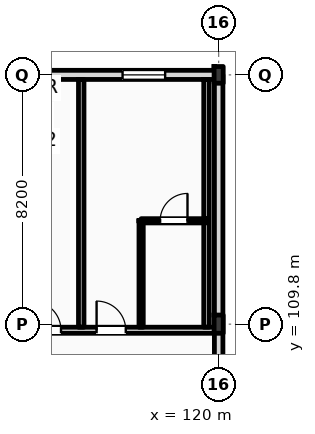
"""IFC4 building model, lengths in metres.
Left out: names, types, materials, properties, quantities, classifications, styles, units other than length and angle.
Written with IfcOpenShell. Run it as: python <this file> out.ifc"""

import sys

from ifc_helpers import new_model, si_unit, direction, frame, frame_2d, origin, origin_2d, place, context, subcontext, project, spatial, rectangle, i_section, extrude, element, fill, save


model = new_model("IFC4")
c1 = context("Model", 3, precision=1e-05, world=origin(), true_north=direction((0.0, 1.0)))
c2 = subcontext(c1, "Body", "Model", "MODEL_VIEW")
j1 = project(units=[si_unit("LENGTHUNIT", "METRE"), si_unit("PLANEANGLEUNIT", "RADIAN")], contexts=[c1])
p1 = place(None, origin())
s1 = spatial("IfcSite", under=j1, at=p1, CompositionType="ELEMENT")
p2 = place(p1, origin())
s2 = spatial("IfcBuilding", under=s1, at=p2, CompositionType="ELEMENT")
p3 = place(p2, frame((0.0, 0.0, 20.4)))
s3 = spatial("IfcBuildingStorey", under=s2, at=p3, CompositionType="ELEMENT", Elevation=20.4)
p4 = place(p3, frame((120.0, 109.8, 0.0), z_axis=(0.0, 0.0, 1.0), x_axis=(1.0, 0.0, 0.0)))
e1 = element("IfcColumn", 1, at=p4, inside=s3, PredefinedType="COLUMN", context=c2, shape_type="SweptSolid", body=[
    extrude(i_section(OverallWidth=0.3, OverallDepth=0.6, WebThickness=0.015, FlangeThickness=0.03, FilletRadius=0.027, at=origin_2d()), origin(), (0.0, 0.0, 1.0), 4.2),
])
p5 = place(p3, frame((120.0, 118.0, 0.0), z_axis=(0.0, 0.0, 1.0), x_axis=(1.0, 0.0, 0.0)))
e2 = element("IfcColumn", 2, at=p5, inside=s3, PredefinedType="COLUMN", context=c2, shape_type="SweptSolid", body=[
    extrude(i_section(OverallWidth=0.3, OverallDepth=0.55, WebThickness=0.015, FlangeThickness=0.029, FilletRadius=0.027, at=origin_2d()), origin(), (0.0, 0.0, 1.0), 4.2),
])
p6 = place(p3, frame((22.5, 118.0, 0.0), z_axis=(0.0, 0.0, 1.0), x_axis=(1.0, 0.0, 0.0)))
e3 = element("IfcWall", 3, at=p6, inside=s3, PredefinedType="STANDARD", context=c2, shape_type="SweptSolid", body=[
    extrude(rectangle(XDim=97.5, YDim=0.3, at=frame_2d((48.75, 0.0))), origin(), (0.0, 0.0, 1.0), 3.38),
])
p7 = place(p6, frame((0.91, 0.0, 0.9)))
e4 = element("IfcOpeningElement", 4, at=p7, cuts=e3, PredefinedType="OPENING", context=c2, shape_type="SweptSolid", body=[
    extrude(rectangle(XDim=0.9, YDim=1.8, at=frame_2d((0.45, 0.9))), frame((0.0, 0.16, 0.0), z_axis=(0.0, -1.0, 0.0), x_axis=(1.0, 0.0, 0.0)), (0.0, 0.0, 1.0), 0.32),
])
p8 = place(p6, frame((6.36, 0.0, 0.0)))
e5 = element("IfcOpeningElement", 5, at=p8, cuts=e3, PredefinedType="OPENING", context=c2, shape_type="SweptSolid", body=[
    extrude(rectangle(XDim=1.2, YDim=2.25, at=frame_2d((0.6, 1.125))), frame((0.0, 0.16, 0.0), z_axis=(0.0, -1.0, 0.0), x_axis=(1.0, 0.0, 0.0)), (0.0, 0.0, 1.0), 0.32),
])
p9 = place(p6, frame((11.41, 0.0, 0.9)))
e6 = element("IfcOpeningElement", 6, at=p9, cuts=e3, PredefinedType="OPENING", context=c2, shape_type="SweptSolid", body=[
    extrude(rectangle(XDim=1.1, YDim=1.9, at=frame_2d((0.55, 0.95))), frame((0.0, 0.16, 0.0), z_axis=(0.0, -1.0, 0.0), x_axis=(1.0, 0.0, 0.0)), (0.0, 0.0, 1.0), 0.32),
])
p10 = place(p6, frame((14.335, 0.0, 0.9)))
e7 = element("IfcOpeningElement", 7, at=p10, cuts=e3, PredefinedType="OPENING", context=c2, shape_type="SweptSolid", body=[
    extrude(rectangle(XDim=1.65, YDim=1.95, at=frame_2d((0.825, 0.975))), frame((0.0, 0.16, 0.0), z_axis=(0.0, -1.0, 0.0), x_axis=(1.0, 0.0, 0.0)), (0.0, 0.0, 1.0), 0.32),
])
p11 = place(p6, frame((19.26, 0.0, 0.9)))
e8 = element("IfcOpeningElement", 8, at=p11, cuts=e3, PredefinedType="OPENING", context=c2, shape_type="SweptSolid", body=[
    extrude(rectangle(XDim=1.35, YDim=2.0, at=frame_2d((0.675, 1.0))), frame((0.0, 0.16, 0.0), z_axis=(0.0, -1.0, 0.0), x_axis=(1.0, 0.0, 0.0)), (0.0, 0.0, 1.0), 0.32),
])
p12 = place(p6, frame((22.8, 0.0, 0.0)))
e9 = element("IfcOpeningElement", 9, at=p12, cuts=e3, PredefinedType="OPENING", context=c2, shape_type="SweptSolid", body=[
    extrude(rectangle(XDim=1.2, YDim=2.25, at=frame_2d((0.6, 1.125))), frame((0.0, 0.16, 0.0), z_axis=(0.0, -1.0, 0.0), x_axis=(1.0, 0.0, 0.0)), (0.0, 0.0, 1.0), 0.32),
])
p13 = place(p6, frame((26.91, 0.0, 0.9)))
e10 = element("IfcOpeningElement", 10, at=p13, cuts=e3, PredefinedType="OPENING", context=c2, shape_type="SweptSolid", body=[
    extrude(rectangle(XDim=2.1, YDim=2.1, at=frame_2d((1.05, 1.05))), frame((0.0, 0.16, 0.0), z_axis=(0.0, -1.0, 0.0), x_axis=(1.0, 0.0, 0.0)), (0.0, 0.0, 1.0), 0.32),
])
p14 = place(p6, frame((30.835, 0.0, 0.9)))
e11 = element("IfcOpeningElement", 11, at=p14, cuts=e3, PredefinedType="OPENING", context=c2, shape_type="SweptSolid", body=[
    extrude(rectangle(XDim=2.25, YDim=2.15, at=frame_2d((1.125, 1.075))), frame((0.0, 0.16, 0.0), z_axis=(0.0, -1.0, 0.0), x_axis=(1.0, 0.0, 0.0)), (0.0, 0.0, 1.0), 0.32),
])
p15 = place(p6, frame((34.96, 0.0, 0.9)))
e12 = element("IfcOpeningElement", 12, at=p15, cuts=e3, PredefinedType="OPENING", context=c2, shape_type="SweptSolid", body=[
    extrude(rectangle(XDim=2.4, YDim=2.2, at=frame_2d((1.2, 1.1))), frame((0.0, 0.16, 0.0), z_axis=(0.0, -1.0, 0.0), x_axis=(1.0, 0.0, 0.0)), (0.0, 0.0, 1.0), 0.32),
])
p16 = place(p6, frame((39.0, 0.0, 0.0)))
e13 = element("IfcOpeningElement", 13, at=p16, cuts=e3, PredefinedType="OPENING", context=c2, shape_type="SweptSolid", body=[
    extrude(rectangle(XDim=1.2, YDim=2.25, at=frame_2d((0.6, 1.125))), frame((0.0, 0.16, 0.0), z_axis=(0.0, -1.0, 0.0), x_axis=(1.0, 0.0, 0.0)), (0.0, 0.0, 1.0), 0.32),
])
p17 = place(p6, frame((43.21, 0.0, 0.9)))
e14 = element("IfcOpeningElement", 14, at=p17, cuts=e3, PredefinedType="OPENING", context=c2, shape_type="SweptSolid", body=[
    extrude(rectangle(XDim=2.7, YDim=2.3, at=frame_2d((1.35, 1.15))), frame((0.0, 0.16, 0.0), z_axis=(0.0, -1.0, 0.0), x_axis=(1.0, 0.0, 0.0)), (0.0, 0.0, 1.0), 0.32),
])
p18 = place(p6, frame((47.335, 0.0, 0.9)))
e15 = element("IfcOpeningElement", 15, at=p18, cuts=e3, PredefinedType="OPENING", context=c2, shape_type="SweptSolid", body=[
    extrude(rectangle(XDim=1.35, YDim=2.3, at=frame_2d((0.675, 1.15))), frame((0.0, 0.16, 0.0), z_axis=(0.0, -1.0, 0.0), x_axis=(1.0, 0.0, 0.0)), (0.0, 0.0, 1.0), 0.32),
])
p19 = place(p6, frame((52.74, 0.0, 0.0)))
e16 = element("IfcOpeningElement", 16, at=p19, cuts=e3, PredefinedType="OPENING", context=c2, shape_type="SweptSolid", body=[
    extrude(rectangle(XDim=1.2, YDim=2.25, at=frame_2d((0.6, 1.125))), frame((0.0, 0.16, 0.0), z_axis=(0.0, -1.0, 0.0), x_axis=(1.0, 0.0, 0.0)), (0.0, 0.0, 1.0), 0.32),
])
p20 = place(p6, frame((55.36, 0.0, 0.9)))
e17 = element("IfcOpeningElement", 17, at=p20, cuts=e3, PredefinedType="OPENING", context=c2, shape_type="SweptSolid", body=[
    extrude(rectangle(XDim=1.1, YDim=2.3, at=frame_2d((0.55, 1.15))), frame((0.0, 0.16, 0.0), z_axis=(0.0, -1.0, 0.0), x_axis=(1.0, 0.0, 0.0)), (0.0, 0.0, 1.0), 0.32),
])
p21 = place(p6, frame((59.99, 0.0, 0.9)))
e18 = element("IfcOpeningElement", 18, at=p21, cuts=e3, PredefinedType="OPENING", context=c2, shape_type="SweptSolid", body=[
    extrude(rectangle(XDim=2.74, YDim=2.3, at=frame_2d((1.37, 1.15))), frame((0.0, 0.16, 0.0), z_axis=(0.0, -1.0, 0.0), x_axis=(1.0, 0.0, 0.0)), (0.0, 0.0, 1.0), 0.32),
])
p22 = place(p6, frame((65.95, 0.0, 0.9)))
e19 = element("IfcOpeningElement", 19, at=p22, cuts=e3, PredefinedType="OPENING", context=c2, shape_type="SweptSolid", body=[
    extrude(rectangle(XDim=1.35, YDim=2.3, at=frame_2d((0.675, 1.15))), frame((0.0, 0.16, 0.0), z_axis=(0.0, -1.0, 0.0), x_axis=(1.0, 0.0, 0.0)), (0.0, 0.0, 1.0), 0.32),
])
p23 = place(p6, frame((69.16, 0.0, 0.0)))
e20 = element("IfcOpeningElement", 20, at=p23, cuts=e3, PredefinedType="OPENING", context=c2, shape_type="SweptSolid", body=[
    extrude(rectangle(XDim=1.2, YDim=2.25, at=frame_2d((0.6, 1.125))), frame((0.0, 0.16, 0.0), z_axis=(0.0, -1.0, 0.0), x_axis=(1.0, 0.0, 0.0)), (0.0, 0.0, 1.0), 0.32),
])
p24 = place(p6, frame((73.75, 0.0, 0.9)))
e21 = element("IfcOpeningElement", 21, at=p24, cuts=e3, PredefinedType="OPENING", context=c2, shape_type="SweptSolid", body=[
    extrude(rectangle(XDim=1.8, YDim=2.3, at=frame_2d((0.9, 1.15))), frame((0.0, 0.16, 0.0), z_axis=(0.0, -1.0, 0.0), x_axis=(1.0, 0.0, 0.0)), (0.0, 0.0, 1.0), 0.32),
])
p25 = place(p6, frame((76.79, 0.0, 0.9)))
e22 = element("IfcOpeningElement", 22, at=p25, cuts=e3, PredefinedType="OPENING", context=c2, shape_type="SweptSolid", body=[
    extrude(rectangle(XDim=2.74, YDim=2.3, at=frame_2d((1.37, 1.15))), frame((0.0, 0.16, 0.0), z_axis=(0.0, -1.0, 0.0), x_axis=(1.0, 0.0, 0.0)), (0.0, 0.0, 1.0), 0.32),
])
p26 = place(p6, frame((81.55, 0.0, 0.9)))
e23 = element("IfcOpeningElement", 23, at=p26, cuts=e3, PredefinedType="OPENING", context=c2, shape_type="SweptSolid", body=[
    extrude(rectangle(XDim=1.8, YDim=2.3, at=frame_2d((0.9, 1.15))), frame((0.0, 0.16, 0.0), z_axis=(0.0, -1.0, 0.0), x_axis=(1.0, 0.0, 0.0)), (0.0, 0.0, 1.0), 0.32),
])
p27 = place(p6, frame((86.01, 0.0, 0.9)))
e24 = element("IfcOpeningElement", 24, at=p27, cuts=e3, PredefinedType="OPENING", context=c2, shape_type="SweptSolid", body=[
    extrude(rectangle(XDim=1.1, YDim=1.5, at=frame_2d((0.55, 0.75))), frame((0.0, 0.16, 0.0), z_axis=(0.0, -1.0, 0.0), x_axis=(1.0, 0.0, 0.0)), (0.0, 0.0, 1.0), 0.32),
])
p28 = place(p6, frame((90.135, 0.0, 0.9)))
e25 = element("IfcOpeningElement", 25, at=p28, cuts=e3, PredefinedType="OPENING", context=c2, shape_type="SweptSolid", body=[
    extrude(rectangle(XDim=1.25, YDim=1.6, at=frame_2d((0.625, 0.8))), frame((0.0, 0.16, 0.0), z_axis=(0.0, -1.0, 0.0), x_axis=(1.0, 0.0, 0.0)), (0.0, 0.0, 1.0), 0.32),
])
p29 = place(p6, frame((94.34, 0.0, 0.9)))
e26 = element("IfcOpeningElement", 26, at=p29, cuts=e3, PredefinedType="OPENING", context=c2, shape_type="SweptSolid", body=[
    extrude(rectangle(XDim=1.4, YDim=1.7, at=frame_2d((0.7, 0.85))), frame((0.0, 0.16, 0.0), z_axis=(0.0, -1.0, 0.0), x_axis=(1.0, 0.0, 0.0)), (0.0, 0.0, 1.0), 0.32),
])
p30 = place(p3, frame((120.0, 96.0, 0.0), z_axis=(0.0, 0.0, 1.0), x_axis=(0.0, 1.0, 0.0)))
e27 = element("IfcWall", 27, at=p30, inside=s3, PredefinedType="STANDARD", context=c2, shape_type="SweptSolid", body=[
    extrude(rectangle(XDim=22.0, YDim=0.28, at=frame_2d((11.0, 0.0))), origin(), (0.0, 0.0, 1.0), 3.53),
])
p31 = place(p3, frame((10.65, 109.6, 0.0), z_axis=(0.0, 0.0, 1.0), x_axis=(1.0, 0.0, 0.0)))
e28 = element("IfcWall", 28, at=p31, inside=s3, PredefinedType="PARTITIONING", context=c2, shape_type="SweptSolid", body=[
    extrude(rectangle(XDim=109.21, YDim=0.2, at=frame_2d((54.605, 0.0))), origin(), (0.0, 0.0, 1.0), 3.38),
])
p32 = place(p31, frame((12.535, 0.0, 0.0)))
e29 = element("IfcOpeningElement", 29, at=p32, cuts=e28, PredefinedType="OPENING", context=c2, shape_type="SweptSolid", body=[
    extrude(rectangle(XDim=1.02, YDim=2.2, at=frame_2d((0.51, 1.1))), frame((0.0, 0.11, 0.0), z_axis=(0.0, -1.0, 0.0), x_axis=(1.0, 0.0, 0.0)), (0.0, 0.0, 1.0), 0.22),
])
p33 = place(p31, frame((19.175, 0.0, 0.0)))
e30 = element("IfcOpeningElement", 30, at=p33, cuts=e28, PredefinedType="OPENING", context=c2, shape_type="SweptSolid", body=[
    extrude(rectangle(XDim=1.02, YDim=2.2, at=frame_2d((0.51, 1.1))), frame((0.0, 0.11, 0.0), z_axis=(0.0, -1.0, 0.0), x_axis=(1.0, 0.0, 0.0)), (0.0, 0.0, 1.0), 0.22),
])
p34 = place(p31, frame((23.375, 0.0, 0.0)))
e31 = element("IfcOpeningElement", 31, at=p34, cuts=e28, PredefinedType="OPENING", context=c2, shape_type="SweptSolid", body=[
    extrude(rectangle(XDim=1.02, YDim=2.2, at=frame_2d((0.51, 1.1))), frame((0.0, 0.11, 0.0), z_axis=(0.0, -1.0, 0.0), x_axis=(1.0, 0.0, 0.0)), (0.0, 0.0, 1.0), 0.22),
])
p35 = place(p31, frame((27.575, 0.0, 0.0)))
e32 = element("IfcOpeningElement", 32, at=p35, cuts=e28, PredefinedType="OPENING", context=c2, shape_type="SweptSolid", body=[
    extrude(rectangle(XDim=1.02, YDim=2.2, at=frame_2d((0.51, 1.1))), frame((0.0, 0.11, 0.0), z_axis=(0.0, -1.0, 0.0), x_axis=(1.0, 0.0, 0.0)), (0.0, 0.0, 1.0), 0.22),
])
p36 = place(p31, frame((31.805, 0.0, 0.0)))
e33 = element("IfcOpeningElement", 33, at=p36, cuts=e28, PredefinedType="OPENING", context=c2, shape_type="SweptSolid", body=[
    extrude(rectangle(XDim=0.96, YDim=2.2, at=frame_2d((0.48, 1.1))), frame((0.0, 0.11, 0.0), z_axis=(0.0, -1.0, 0.0), x_axis=(1.0, 0.0, 0.0)), (0.0, 0.0, 1.0), 0.22),
])
p37 = place(p31, frame((33.855, 0.0, 0.0)))
e34 = element("IfcOpeningElement", 34, at=p37, cuts=e28, PredefinedType="OPENING", context=c2, shape_type="SweptSolid", body=[
    extrude(rectangle(XDim=0.96, YDim=2.2, at=frame_2d((0.48, 1.1))), frame((0.0, 0.11, 0.0), z_axis=(0.0, -1.0, 0.0), x_axis=(1.0, 0.0, 0.0)), (0.0, 0.0, 1.0), 0.22),
])
p38 = place(p31, frame((40.205, 0.0, 0.0)))
e35 = element("IfcOpeningElement", 35, at=p38, cuts=e28, PredefinedType="OPENING", context=c2, shape_type="SweptSolid", body=[
    extrude(rectangle(XDim=0.96, YDim=2.2, at=frame_2d((0.48, 1.1))), frame((0.0, 0.11, 0.0), z_axis=(0.0, -1.0, 0.0), x_axis=(1.0, 0.0, 0.0)), (0.0, 0.0, 1.0), 0.22),
])
p39 = place(p31, frame((42.255, 0.0, 0.0)))
e36 = element("IfcOpeningElement", 36, at=p39, cuts=e28, PredefinedType="OPENING", context=c2, shape_type="SweptSolid", body=[
    extrude(rectangle(XDim=0.96, YDim=2.2, at=frame_2d((0.48, 1.1))), frame((0.0, 0.11, 0.0), z_axis=(0.0, -1.0, 0.0), x_axis=(1.0, 0.0, 0.0)), (0.0, 0.0, 1.0), 0.22),
])
p40 = place(p31, frame((48.605, 0.0, 0.0)))
e37 = element("IfcOpeningElement", 37, at=p40, cuts=e28, PredefinedType="OPENING", context=c2, shape_type="SweptSolid", body=[
    extrude(rectangle(XDim=0.96, YDim=2.2, at=frame_2d((0.48, 1.1))), frame((0.0, 0.11, 0.0), z_axis=(0.0, -1.0, 0.0), x_axis=(1.0, 0.0, 0.0)), (0.0, 0.0, 1.0), 0.22),
])
p41 = place(p31, frame((50.655, 0.0, 0.0)))
e38 = element("IfcOpeningElement", 38, at=p41, cuts=e28, PredefinedType="OPENING", context=c2, shape_type="SweptSolid", body=[
    extrude(rectangle(XDim=0.96, YDim=2.2, at=frame_2d((0.48, 1.1))), frame((0.0, 0.11, 0.0), z_axis=(0.0, -1.0, 0.0), x_axis=(1.0, 0.0, 0.0)), (0.0, 0.0, 1.0), 0.22),
])
p42 = place(p31, frame((57.005, 0.0, 0.0)))
e39 = element("IfcOpeningElement", 39, at=p42, cuts=e28, PredefinedType="OPENING", context=c2, shape_type="SweptSolid", body=[
    extrude(rectangle(XDim=0.96, YDim=2.2, at=frame_2d((0.48, 1.1))), frame((0.0, 0.11, 0.0), z_axis=(0.0, -1.0, 0.0), x_axis=(1.0, 0.0, 0.0)), (0.0, 0.0, 1.0), 0.22),
])
p43 = place(p31, frame((59.055, 0.0, 0.0)))
e40 = element("IfcOpeningElement", 40, at=p43, cuts=e28, PredefinedType="OPENING", context=c2, shape_type="SweptSolid", body=[
    extrude(rectangle(XDim=0.96, YDim=2.2, at=frame_2d((0.48, 1.1))), frame((0.0, 0.11, 0.0), z_axis=(0.0, -1.0, 0.0), x_axis=(1.0, 0.0, 0.0)), (0.0, 0.0, 1.0), 0.22),
])
p44 = place(p31, frame((65.405, 0.0, 0.0)))
e41 = element("IfcOpeningElement", 41, at=p44, cuts=e28, PredefinedType="OPENING", context=c2, shape_type="SweptSolid", body=[
    extrude(rectangle(XDim=0.96, YDim=2.2, at=frame_2d((0.48, 1.1))), frame((0.0, 0.11, 0.0), z_axis=(0.0, -1.0, 0.0), x_axis=(1.0, 0.0, 0.0)), (0.0, 0.0, 1.0), 0.22),
])
p45 = place(p31, frame((67.205, 0.0, 0.0)))
e42 = element("IfcOpeningElement", 42, at=p45, cuts=e28, PredefinedType="OPENING", context=c2, shape_type="SweptSolid", body=[
    extrude(rectangle(XDim=0.96, YDim=2.2, at=frame_2d((0.48, 1.1))), frame((0.0, 0.11, 0.0), z_axis=(0.0, -1.0, 0.0), x_axis=(1.0, 0.0, 0.0)), (0.0, 0.0, 1.0), 0.22),
])
p46 = place(p31, frame((73.805, 0.0, 0.0)))
e43 = element("IfcOpeningElement", 43, at=p46, cuts=e28, PredefinedType="OPENING", context=c2, shape_type="SweptSolid", body=[
    extrude(rectangle(XDim=0.96, YDim=2.2, at=frame_2d((0.48, 1.1))), frame((0.0, 0.11, 0.0), z_axis=(0.0, -1.0, 0.0), x_axis=(1.0, 0.0, 0.0)), (0.0, 0.0, 1.0), 0.22),
])
p47 = place(p31, frame((78.255, 0.0, 0.0)))
e44 = element("IfcOpeningElement", 44, at=p47, cuts=e28, PredefinedType="OPENING", context=c2, shape_type="SweptSolid", body=[
    extrude(rectangle(XDim=0.96, YDim=2.2, at=frame_2d((0.48, 1.1))), frame((0.0, 0.11, 0.0), z_axis=(0.0, -1.0, 0.0), x_axis=(1.0, 0.0, 0.0)), (0.0, 0.0, 1.0), 0.22),
])
p48 = place(p31, frame((82.205, 0.0, 0.0)))
e45 = element("IfcOpeningElement", 45, at=p48, cuts=e28, PredefinedType="OPENING", context=c2, shape_type="SweptSolid", body=[
    extrude(rectangle(XDim=0.96, YDim=2.2, at=frame_2d((0.48, 1.1))), frame((0.0, 0.11, 0.0), z_axis=(0.0, -1.0, 0.0), x_axis=(1.0, 0.0, 0.0)), (0.0, 0.0, 1.0), 0.22),
])
p49 = place(p31, frame((86.405, 0.0, 0.0)))
e46 = element("IfcOpeningElement", 46, at=p49, cuts=e28, PredefinedType="OPENING", context=c2, shape_type="SweptSolid", body=[
    extrude(rectangle(XDim=0.96, YDim=2.2, at=frame_2d((0.48, 1.1))), frame((0.0, 0.11, 0.0), z_axis=(0.0, -1.0, 0.0), x_axis=(1.0, 0.0, 0.0)), (0.0, 0.0, 1.0), 0.22),
])
p50 = place(p31, frame((90.605, 0.0, 0.0)))
e47 = element("IfcOpeningElement", 47, at=p50, cuts=e28, PredefinedType="OPENING", context=c2, shape_type="SweptSolid", body=[
    extrude(rectangle(XDim=0.96, YDim=2.2, at=frame_2d((0.48, 1.1))), frame((0.0, 0.11, 0.0), z_axis=(0.0, -1.0, 0.0), x_axis=(1.0, 0.0, 0.0)), (0.0, 0.0, 1.0), 0.22),
])
p51 = place(p31, frame((94.805, 0.0, 0.0)))
e48 = element("IfcOpeningElement", 48, at=p51, cuts=e28, PredefinedType="OPENING", context=c2, shape_type="SweptSolid", body=[
    extrude(rectangle(XDim=0.96, YDim=2.2, at=frame_2d((0.48, 1.1))), frame((0.0, 0.11, 0.0), z_axis=(0.0, -1.0, 0.0), x_axis=(1.0, 0.0, 0.0)), (0.0, 0.0, 1.0), 0.22),
])
p52 = place(p31, frame((99.005, 0.0, 0.0)))
e49 = element("IfcOpeningElement", 49, at=p52, cuts=e28, PredefinedType="OPENING", context=c2, shape_type="SweptSolid", body=[
    extrude(rectangle(XDim=0.96, YDim=2.2, at=frame_2d((0.48, 1.1))), frame((0.0, 0.11, 0.0), z_axis=(0.0, -1.0, 0.0), x_axis=(1.0, 0.0, 0.0)), (0.0, 0.0, 1.0), 0.22),
])
p53 = place(p31, frame((103.205, 0.0, 0.0)))
e50 = element("IfcOpeningElement", 50, at=p53, cuts=e28, PredefinedType="OPENING", context=c2, shape_type="SweptSolid", body=[
    extrude(rectangle(XDim=0.96, YDim=2.2, at=frame_2d((0.48, 1.1))), frame((0.0, 0.11, 0.0), z_axis=(0.0, -1.0, 0.0), x_axis=(1.0, 0.0, 0.0)), (0.0, 0.0, 1.0), 0.22),
])
p54 = place(p31, frame((105.335, 0.0, 0.0)))
e51 = element("IfcOpeningElement", 51, at=p54, cuts=e28, PredefinedType="OPENING", context=c2, shape_type="SweptSolid", body=[
    extrude(rectangle(XDim=0.96, YDim=2.2, at=frame_2d((0.48, 1.1))), frame((0.0, 0.11, 0.0), z_axis=(0.0, -1.0, 0.0), x_axis=(1.0, 0.0, 0.0)), (0.0, 0.0, 1.0), 0.22),
])
p55 = place(p31, frame((2.716, 0.0, 0.0)))
e52 = element("IfcOpeningElement", 52, at=p55, cuts=e28, PredefinedType="OPENING", context=c2, shape_type="SweptSolid", body=[
    extrude(rectangle(XDim=1.35, YDim=2.25, at=frame_2d((0.675, 1.125))), frame((0.0, 0.11, 0.0), z_axis=(0.0, -1.0, 0.0), x_axis=(1.0, 0.0, 0.0)), (0.0, 0.0, 1.0), 0.22),
])
p56 = place(p31, frame((6.65, 0.0, 0.0)))
e53 = element("IfcOpeningElement", 53, at=p56, cuts=e28, PredefinedType="OPENING", context=c2, shape_type="SweptSolid", body=[
    extrude(rectangle(XDim=1.35, YDim=2.25, at=frame_2d((0.675, 1.125))), frame((0.0, 0.11, 0.0), z_axis=(0.0, -1.0, 0.0), x_axis=(1.0, 0.0, 0.0)), (0.0, 0.0, 1.0), 0.22),
])
p57 = place(p31, frame((10.583, 0.0, 0.0)))
e54 = element("IfcOpeningElement", 54, at=p57, cuts=e28, PredefinedType="OPENING", context=c2, shape_type="SweptSolid", body=[
    extrude(rectangle(XDim=1.35, YDim=2.25, at=frame_2d((0.675, 1.125))), frame((0.0, 0.11, 0.0), z_axis=(0.0, -1.0, 0.0), x_axis=(1.0, 0.0, 0.0)), (0.0, 0.0, 1.0), 0.22),
])
for number, where, z_axis, x_axis in (
    (55, (115.48, 109.7, 0.0), (0.0, 0.0, 1.0), (0.0, 1.0, 0.0)),
    (56, (119.6, 109.7, 0.0), (0.0, 0.0, 1.0), (0.0, 1.0, 0.0)),
):
    element("IfcWall", number, at=place(p3, frame(where, z_axis=z_axis, x_axis=x_axis)), inside=s3, PredefinedType="PARTITIONING", context=c2, shape_type="SweptSolid", body=[
        extrude(rectangle(XDim=8.15, YDim=0.18, at=frame_2d((4.075, 0.0))), origin(), (0.0, 0.0, 1.0), 3.94),
    ])
p58 = place(p3, frame((117.45, 109.7, 0.0), z_axis=(0.0, 0.0, 1.0), x_axis=(0.0, 1.0, 0.0)))
e57 = element("IfcWall", 57, at=p58, inside=s3, PredefinedType="PARTITIONING", context=c2, shape_type="SweptSolid", body=[
    extrude(rectangle(XDim=3.5, YDim=0.14, at=frame_2d((1.75, 0.0))), origin(), (0.0, 0.0, 1.0), 3.94),
])
p59 = place(p3, frame((117.45, 113.2, 0.0), z_axis=(0.0, 0.0, 1.0), x_axis=(1.0, 0.0, 0.0)))
e58 = element("IfcWall", 58, at=p59, inside=s3, PredefinedType="PARTITIONING", context=c2, shape_type="SweptSolid", body=[
    extrude(rectangle(XDim=2.15, YDim=0.14, at=frame_2d((1.075, 0.0))), origin(), (0.0, 0.0, 1.0), 3.94),
])
p60 = place(p59, frame((0.625, 0.0, 0.0)))
e59 = element("IfcOpeningElement", 59, at=p60, cuts=e58, PredefinedType="OPENING", context=c2, shape_type="SweptSolid", body=[
    extrude(rectangle(XDim=0.9, YDim=2.1, at=frame_2d((0.45, 1.05))), frame((0.0, 0.08, 0.0), z_axis=(0.0, -1.0, 0.0), x_axis=(1.0, 0.0, 0.0)), (0.0, 0.0, 1.0), 0.16),
])
p61 = place(p29, origin())
e60 = element("IfcWindow", 60, at=p61, inside=s3, PartitioningType="DOUBLE_PANEL_VERTICAL", PredefinedType="WINDOW", context=c2, shape_type="SweptSolid", body=[
    extrude(rectangle(XDim=1.4, YDim=1.7, at=frame_2d((0.7, 0.85))), frame((0.0, 0.03, 0.0), z_axis=(0.0, -1.0, 0.0), x_axis=(1.0, 0.0, 0.0)), (0.0, 0.0, 1.0), 0.06),
])
fill(e26, e60)
p62 = place(p53, origin())
e61 = element("IfcDoor", 61, at=p62, inside=s3, OperationType="SINGLE_SWING_LEFT", PredefinedType="DOOR", context=c2, shape_type="SweptSolid", body=[
    extrude(rectangle(XDim=0.96, YDim=2.2, at=frame_2d((0.48, 1.1))), frame((0.0, 0.025, 0.0), z_axis=(0.0, -1.0, 0.0), x_axis=(1.0, 0.0, 0.0)), (0.0, 0.0, 1.0), 0.05),
])
fill(e50, e61)
p63 = place(p54, origin())
e62 = element("IfcDoor", 62, at=p63, inside=s3, OperationType="SINGLE_SWING_LEFT", PredefinedType="DOOR", context=c2, shape_type="SweptSolid", body=[
    extrude(rectangle(XDim=0.96, YDim=2.2, at=frame_2d((0.48, 1.1))), frame((0.0, 0.025, 0.0), z_axis=(0.0, -1.0, 0.0), x_axis=(1.0, 0.0, 0.0)), (0.0, 0.0, 1.0), 0.05),
])
fill(e51, e62)
p64 = place(p60, origin())
e63 = element("IfcDoor", 63, at=p64, inside=s3, OperationType="SINGLE_SWING_RIGHT", PredefinedType="DOOR", context=c2, shape_type="SweptSolid", body=[
    extrude(rectangle(XDim=0.9, YDim=2.1, at=frame_2d((0.45, 1.05))), frame((0.0, 0.025, 0.0), z_axis=(0.0, -1.0, 0.0), x_axis=(1.0, 0.0, 0.0)), (0.0, 0.0, 1.0), 0.05),
])
fill(e59, e63)
save(model, sys.argv[1])
